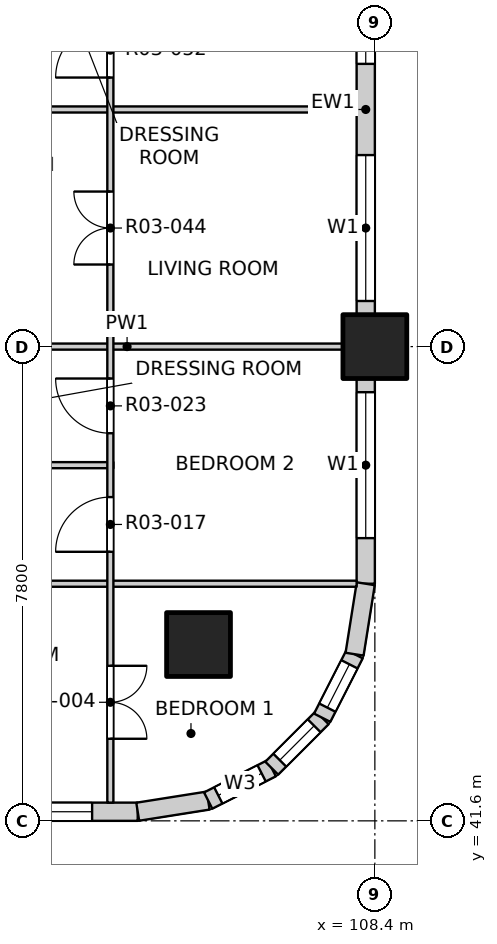
"""IFC4 building model, lengths in metres.
Left out: names, types, materials, properties, quantities, classifications, styles, units other than length and angle.
Written with IfcOpenShell. Run it as: python <this file> out.ifc"""

import sys

from ifc_helpers import new_model, si_unit, direction, frame, frame_2d, origin, origin_2d, place, context, subcontext, project, spatial, rectangle, extrude, element, fill, save


model = new_model("IFC4")
c1 = context("Model", 3, precision=1e-05, world=origin(), true_north=direction((0.0, 1.0)))
c2 = subcontext(c1, "Body", "Model", "MODEL_VIEW")
j1 = project(units=[si_unit("LENGTHUNIT", "METRE"), si_unit("PLANEANGLEUNIT", "RADIAN")], contexts=[c1])
p1 = place(None, origin())
s1 = spatial("IfcSite", under=j1, at=p1, CompositionType="ELEMENT")
p2 = place(p1, origin())
s2 = spatial("IfcBuilding", under=s1, at=p2, CompositionType="ELEMENT")
p3 = place(p2, frame((0.0, 0.0, 39.9)))
s3 = spatial("IfcBuildingStorey", under=s2, at=p3, CompositionType="ELEMENT", Elevation=39.9)
for number, where, z_axis, x_axis in (
    (1, (105.5, 44.5, -0.25), (0.0, 0.0, 1.0), (1.0, 0.0, 0.0)),
    (2, (108.4, 49.4, -0.25), (0.0, 0.0, 1.0), (1.0, 0.0, 0.0)),
):
    element("IfcColumn", number, at=place(p3, frame(where, z_axis=z_axis, x_axis=x_axis)), inside=s3, PredefinedType="COLUMN", context=c2, shape_type="SweptSolid", body=[
        extrude(rectangle(XDim=1.05, YDim=1.05, at=origin_2d()), origin(), (0.0, 0.0, 1.0), 3.4),
    ])
p4 = place(p3, frame((101.125, 41.75, 0.0), z_axis=(0.0, 0.0, 1.0), x_axis=(1.0, 0.0, 0.0)))
e3 = element("IfcWall", 3, at=p4, inside=s3, PredefinedType="SOLIDWALL", context=c2, shape_type="SweptSolid", body=[
    extrude(rectangle(XDim=3.375, YDim=0.3, at=frame_2d((1.688, 0.0))), origin(), (0.0, 0.0, 1.0), 2.7),
])
p5 = place(p4, frame((0.225, 0.0, 0.9)))
e4 = element("IfcOpeningElement", 4, at=p5, cuts=e3, PredefinedType="OPENING", context=c2, shape_type="SweptSolid", body=[
    extrude(rectangle(XDim=2.4, YDim=1.8, at=frame_2d((1.2, 0.9))), frame((0.0, 0.16, 0.0), z_axis=(0.0, -1.0, 0.0), x_axis=(1.0, 0.0, 0.0)), (0.0, 0.0, 1.0), 0.32),
])
p6 = place(p3, frame((108.25, 45.5, 0.0), z_axis=(0.0, 0.0, 1.0), x_axis=(0.0, 1.0, 0.0)))
e5 = element("IfcWall", 5, at=p6, inside=s3, PredefinedType="SOLIDWALL", context=c2, shape_type="SweptSolid", body=[
    extrude(rectangle(XDim=3.375, YDim=0.3, at=frame_2d((1.688, 0.0))), origin(), (0.0, 0.0, 1.0), 2.7),
])
p7 = place(p6, frame((0.75, 0.0, 0.9)))
e6 = element("IfcOpeningElement", 6, at=p7, cuts=e5, PredefinedType="OPENING", context=c2, shape_type="SweptSolid", body=[
    extrude(rectangle(XDim=2.4, YDim=1.8, at=frame_2d((1.2, 0.9))), frame((0.0, 0.16, 0.0), z_axis=(0.0, -1.0, 0.0), x_axis=(1.0, 0.0, 0.0)), (0.0, 0.0, 1.0), 0.32),
])
p8 = place(p3, frame((108.25, 49.925, 0.0), z_axis=(0.0, 0.0, 1.0), x_axis=(0.0, 1.0, 0.0)))
e7 = element("IfcWall", 7, at=p8, inside=s3, PredefinedType="SOLIDWALL", context=c2, shape_type="SweptSolid", body=[
    extrude(rectangle(XDim=6.75, YDim=0.3, at=frame_2d((3.375, 0.0))), origin(), (0.0, 0.0, 1.0), 2.7),
])
p9 = place(p8, frame((0.225, 0.0, 0.9)))
e8 = element("IfcOpeningElement", 8, at=p9, cuts=e7, PredefinedType="OPENING", context=c2, shape_type="SweptSolid", body=[
    extrude(rectangle(XDim=2.4, YDim=1.8, at=frame_2d((1.2, 0.9))), frame((0.0, 0.16, 0.0), z_axis=(0.0, -1.0, 0.0), x_axis=(1.0, 0.0, 0.0)), (0.0, 0.0, 1.0), 0.32),
])
p10 = place(p8, frame((4.125, 0.0, 0.9)))
e9 = element("IfcOpeningElement", 9, at=p10, cuts=e7, PredefinedType="OPENING", context=c2, shape_type="SweptSolid", body=[
    extrude(rectangle(XDim=2.4, YDim=1.8, at=frame_2d((1.2, 0.9))), frame((0.0, 0.16, 0.0), z_axis=(0.0, -1.0, 0.0), x_axis=(1.0, 0.0, 0.0)), (0.0, 0.0, 1.0), 0.32),
])
p11 = place(p3, frame((104.5, 41.75, 0.0), z_axis=(0.0, 0.0, 1.0), x_axis=(0.987678452879, 0.156496880861, 0.0)))
e10 = element("IfcWall", 10, at=p11, inside=s3, PredefinedType="SOLIDWALL", context=c2, shape_type="SweptSolid", body=[
    extrude(rectangle(XDim=1.173, YDim=0.3, at=frame_2d((0.586, 0.0))), origin(), (0.0, 0.0, 1.0), 2.7),
])
p12 = place(p3, frame((105.659, 41.934, 0.0), z_axis=(0.0, 0.0, 1.0), x_axis=(0.890988677504, 0.454025524128, 0.0)))
e11 = element("IfcWall", 11, at=p12, inside=s3, PredefinedType="SOLIDWALL", context=c2, shape_type="SweptSolid", body=[
    extrude(rectangle(XDim=1.173, YDim=0.3, at=frame_2d((0.587, 0.0))), origin(), (0.0, 0.0, 1.0), 2.7),
])
p13 = place(p12, frame((0.187, 0.0, 0.9)))
e12 = element("IfcOpeningElement", 12, at=p13, cuts=e11, PredefinedType="OPENING", context=c2, shape_type="SweptSolid", body=[
    extrude(rectangle(XDim=0.8, YDim=1.2, at=frame_2d((0.4, 0.6))), frame((0.0, 0.16, 0.0), z_axis=(0.0, -1.0, 0.0), x_axis=(1.0, 0.0, 0.0)), (0.0, 0.0, 1.0), 0.32),
])
p14 = place(p3, frame((106.704, 42.466, 0.0), z_axis=(0.0, 0.0, 1.0), x_axis=(0.707106781187, 0.707106781187, 0.0)))
e13 = element("IfcWall", 13, at=p14, inside=s3, PredefinedType="SOLIDWALL", context=c2, shape_type="SweptSolid", body=[
    extrude(rectangle(XDim=1.173, YDim=0.3, at=frame_2d((0.586, 0.0))), origin(), (0.0, 0.0, 1.0), 2.7),
])
p15 = place(p14, frame((0.187, 0.0, 0.9)))
e14 = element("IfcOpeningElement", 14, at=p15, cuts=e13, PredefinedType="OPENING", context=c2, shape_type="SweptSolid", body=[
    extrude(rectangle(XDim=0.8, YDim=1.2, at=frame_2d((0.4, 0.6))), frame((0.0, 0.16, 0.0), z_axis=(0.0, -1.0, 0.0), x_axis=(1.0, 0.0, 0.0)), (0.0, 0.0, 1.0), 0.32),
])
p16 = place(p3, frame((107.534, 43.296, 0.0), z_axis=(0.0, 0.0, 1.0), x_axis=(0.454025524128, 0.890988677504, 0.0)))
e15 = element("IfcWall", 15, at=p16, inside=s3, PredefinedType="SOLIDWALL", context=c2, shape_type="SweptSolid", body=[
    extrude(rectangle(XDim=1.173, YDim=0.3, at=frame_2d((0.587, 0.0))), origin(), (0.0, 0.0, 1.0), 2.7),
])
p17 = place(p16, frame((0.187, 0.0, 0.9)))
e16 = element("IfcOpeningElement", 16, at=p17, cuts=e15, PredefinedType="OPENING", context=c2, shape_type="SweptSolid", body=[
    extrude(rectangle(XDim=0.8, YDim=1.2, at=frame_2d((0.4, 0.6))), frame((0.0, 0.16, 0.0), z_axis=(0.0, -1.0, 0.0), x_axis=(1.0, 0.0, 0.0)), (0.0, 0.0, 1.0), 0.32),
])
p18 = place(p3, frame((108.066, 44.341, 0.0), z_axis=(0.0, 0.0, 1.0), x_axis=(0.156496880861, 0.987678452879, 0.0)))
e17 = element("IfcWall", 17, at=p18, inside=s3, PredefinedType="SOLIDWALL", context=c2, shape_type="SweptSolid", body=[
    extrude(rectangle(XDim=1.173, YDim=0.3, at=frame_2d((0.586, 0.0))), origin(), (0.0, 0.0, 1.0), 2.7),
])
p19 = place(p3, frame((96.6, 45.5, 0.0), z_axis=(0.0, 0.0, 1.0), x_axis=(1.0, 0.0, 0.0)))
e18 = element("IfcWall", 18, at=p19, inside=s3, PredefinedType="PARTITIONING", context=c2, shape_type="SweptSolid", body=[
    extrude(rectangle(XDim=11.5, YDim=0.1, at=frame_2d((5.75, 0.0))), origin(), (0.0, 0.0, 1.0), 3.15),
])
p20 = place(p19, frame((2.635, 0.0, 0.0)))
e19 = element("IfcOpeningElement", 19, at=p20, cuts=e18, PredefinedType="OPENING", context=c2, shape_type="SweptSolid", body=[
    extrude(rectangle(XDim=0.9, YDim=2.1, at=frame_2d((0.45, 1.05))), frame((0.0, 0.06, 0.0), z_axis=(0.0, -1.0, 0.0), x_axis=(1.0, 0.0, 0.0)), (0.0, 0.0, 1.0), 0.12),
])
p21 = place(p3, frame((100.55, 47.45, 0.0), z_axis=(0.0, 0.0, 1.0), x_axis=(1.0, 0.0, 0.0)))
e20 = element("IfcWall", 20, at=p21, inside=s3, PredefinedType="PARTITIONING", context=c2, shape_type="SweptSolid", body=[
    extrude(rectangle(XDim=3.55, YDim=0.1, at=frame_2d((1.775, 0.0))), origin(), (0.0, 0.0, 1.0), 3.15),
])
for number, where, z_axis, x_axis in (
    (21, (100.55, 49.4, 0.0), (0.0, 0.0, 1.0), (1.0, 0.0, 0.0)),
    (22, (100.55, 53.3, 0.0), (0.0, 0.0, 1.0), (1.0, 0.0, 0.0)),
):
    element("IfcWall", number, at=place(p3, frame(where, z_axis=z_axis, x_axis=x_axis)), inside=s3, PredefinedType="PARTITIONING", context=c2, shape_type="SweptSolid", body=[
        extrude(rectangle(XDim=7.55, YDim=0.1, at=frame_2d((3.775, 0.0))), origin(), (0.0, 0.0, 1.0), 3.15),
    ])
p22 = place(p3, frame((104.05, 41.9, 0.0), z_axis=(0.0, 0.0, 1.0), x_axis=(0.0, 1.0, 0.0)))
e23 = element("IfcWall", 23, at=p22, inside=s3, PredefinedType="PARTITIONING", context=c2, shape_type="SweptSolid", body=[
    extrude(rectangle(XDim=46.2, YDim=0.1, at=frame_2d((23.1, 0.0))), origin(), (0.0, 0.0, 1.0), 3.15),
])
p23 = place(p22, frame((1.05, 0.0, 0.0)))
e24 = element("IfcOpeningElement", 24, at=p23, cuts=e23, PredefinedType="OPENING", context=c2, shape_type="SweptSolid", body=[
    extrude(rectangle(XDim=1.2, YDim=2.1, at=frame_2d((0.6, 1.05))), frame((0.0, 0.06, 0.0), z_axis=(0.0, -1.0, 0.0), x_axis=(1.0, 0.0, 0.0)), (0.0, 0.0, 1.0), 0.12),
])
p24 = place(p22, frame((4.125, 0.0, 0.0)))
e25 = element("IfcOpeningElement", 25, at=p24, cuts=e23, PredefinedType="OPENING", context=c2, shape_type="SweptSolid", body=[
    extrude(rectangle(XDim=0.9, YDim=2.1, at=frame_2d((0.45, 1.05))), frame((0.0, 0.06, 0.0), z_axis=(0.0, -1.0, 0.0), x_axis=(1.0, 0.0, 0.0)), (0.0, 0.0, 1.0), 0.12),
])
p25 = place(p22, frame((6.075, 0.0, 0.0)))
e26 = element("IfcOpeningElement", 26, at=p25, cuts=e23, PredefinedType="OPENING", context=c2, shape_type="SweptSolid", body=[
    extrude(rectangle(XDim=0.9, YDim=2.1, at=frame_2d((0.45, 1.05))), frame((0.0, 0.06, 0.0), z_axis=(0.0, -1.0, 0.0), x_axis=(1.0, 0.0, 0.0)), (0.0, 0.0, 1.0), 0.12),
])
p26 = place(p22, frame((8.85, 0.0, 0.0)))
e27 = element("IfcOpeningElement", 27, at=p26, cuts=e23, PredefinedType="OPENING", context=c2, shape_type="SweptSolid", body=[
    extrude(rectangle(XDim=1.2, YDim=2.1, at=frame_2d((0.6, 1.05))), frame((0.0, 0.06, 0.0), z_axis=(0.0, -1.0, 0.0), x_axis=(1.0, 0.0, 0.0)), (0.0, 0.0, 1.0), 0.12),
])
p27 = place(p22, frame((11.925, 0.0, 0.0)))
e28 = element("IfcOpeningElement", 28, at=p27, cuts=e23, PredefinedType="OPENING", context=c2, shape_type="SweptSolid", body=[
    extrude(rectangle(XDim=0.9, YDim=2.1, at=frame_2d((0.45, 1.05))), frame((0.0, 0.06, 0.0), z_axis=(0.0, -1.0, 0.0), x_axis=(1.0, 0.0, 0.0)), (0.0, 0.0, 1.0), 0.12),
])
p28 = place(p22, frame((13.875, 0.0, 0.0)))
e29 = element("IfcOpeningElement", 29, at=p28, cuts=e23, PredefinedType="OPENING", context=c2, shape_type="SweptSolid", body=[
    extrude(rectangle(XDim=0.9, YDim=2.1, at=frame_2d((0.45, 1.05))), frame((0.0, 0.06, 0.0), z_axis=(0.0, -1.0, 0.0), x_axis=(1.0, 0.0, 0.0)), (0.0, 0.0, 1.0), 0.12),
])
p29 = place(p22, frame((15.825, 0.0, 0.0)))
e30 = element("IfcOpeningElement", 30, at=p29, cuts=e23, PredefinedType="OPENING", context=c2, shape_type="SweptSolid", body=[
    extrude(rectangle(XDim=0.9, YDim=2.1, at=frame_2d((0.45, 1.05))), frame((0.0, 0.06, 0.0), z_axis=(0.0, -1.0, 0.0), x_axis=(1.0, 0.0, 0.0)), (0.0, 0.0, 1.0), 0.12),
])
p30 = place(p22, frame((17.775, 0.0, 0.0)))
e31 = element("IfcOpeningElement", 31, at=p30, cuts=e23, PredefinedType="OPENING", context=c2, shape_type="SweptSolid", body=[
    extrude(rectangle(XDim=0.9, YDim=2.1, at=frame_2d((0.45, 1.05))), frame((0.0, 0.06, 0.0), z_axis=(0.0, -1.0, 0.0), x_axis=(1.0, 0.0, 0.0)), (0.0, 0.0, 1.0), 0.12),
])
p31 = place(p22, frame((19.725, 0.0, 0.0)))
e32 = element("IfcOpeningElement", 32, at=p31, cuts=e23, PredefinedType="OPENING", context=c2, shape_type="SweptSolid", body=[
    extrude(rectangle(XDim=0.9, YDim=2.1, at=frame_2d((0.45, 1.05))), frame((0.0, 0.06, 0.0), z_axis=(0.0, -1.0, 0.0), x_axis=(1.0, 0.0, 0.0)), (0.0, 0.0, 1.0), 0.12),
])
p32 = place(p22, frame((21.675, 0.0, 0.0)))
e33 = element("IfcOpeningElement", 33, at=p32, cuts=e23, PredefinedType="OPENING", context=c2, shape_type="SweptSolid", body=[
    extrude(rectangle(XDim=0.9, YDim=2.1, at=frame_2d((0.45, 1.05))), frame((0.0, 0.06, 0.0), z_axis=(0.0, -1.0, 0.0), x_axis=(1.0, 0.0, 0.0)), (0.0, 0.0, 1.0), 0.12),
])
p33 = place(p22, frame((24.45, 0.0, 0.0)))
e34 = element("IfcOpeningElement", 34, at=p33, cuts=e23, PredefinedType="OPENING", context=c2, shape_type="SweptSolid", body=[
    extrude(rectangle(XDim=1.2, YDim=2.1, at=frame_2d((0.6, 1.05))), frame((0.0, 0.06, 0.0), z_axis=(0.0, -1.0, 0.0), x_axis=(1.0, 0.0, 0.0)), (0.0, 0.0, 1.0), 0.12),
])
p34 = place(p22, frame((28.35, 0.0, 0.0)))
e35 = element("IfcOpeningElement", 35, at=p34, cuts=e23, PredefinedType="OPENING", context=c2, shape_type="SweptSolid", body=[
    extrude(rectangle(XDim=1.2, YDim=2.1, at=frame_2d((0.6, 1.05))), frame((0.0, 0.06, 0.0), z_axis=(0.0, -1.0, 0.0), x_axis=(1.0, 0.0, 0.0)), (0.0, 0.0, 1.0), 0.12),
])
p35 = place(p22, frame((31.425, 0.0, 0.0)))
e36 = element("IfcOpeningElement", 36, at=p35, cuts=e23, PredefinedType="OPENING", context=c2, shape_type="SweptSolid", body=[
    extrude(rectangle(XDim=0.9, YDim=2.1, at=frame_2d((0.45, 1.05))), frame((0.0, 0.06, 0.0), z_axis=(0.0, -1.0, 0.0), x_axis=(1.0, 0.0, 0.0)), (0.0, 0.0, 1.0), 0.12),
])
p36 = place(p22, frame((33.375, 0.0, 0.0)))
e37 = element("IfcOpeningElement", 37, at=p36, cuts=e23, PredefinedType="OPENING", context=c2, shape_type="SweptSolid", body=[
    extrude(rectangle(XDim=0.9, YDim=2.1, at=frame_2d((0.45, 1.05))), frame((0.0, 0.06, 0.0), z_axis=(0.0, -1.0, 0.0), x_axis=(1.0, 0.0, 0.0)), (0.0, 0.0, 1.0), 0.12),
])
p37 = place(p22, frame((35.325, 0.0, 0.0)))
e38 = element("IfcOpeningElement", 38, at=p37, cuts=e23, PredefinedType="OPENING", context=c2, shape_type="SweptSolid", body=[
    extrude(rectangle(XDim=0.9, YDim=2.1, at=frame_2d((0.45, 1.05))), frame((0.0, 0.06, 0.0), z_axis=(0.0, -1.0, 0.0), x_axis=(1.0, 0.0, 0.0)), (0.0, 0.0, 1.0), 0.12),
])
p38 = place(p22, frame((37.275, 0.0, 0.0)))
e39 = element("IfcOpeningElement", 39, at=p38, cuts=e23, PredefinedType="OPENING", context=c2, shape_type="SweptSolid", body=[
    extrude(rectangle(XDim=0.9, YDim=2.1, at=frame_2d((0.45, 1.05))), frame((0.0, 0.06, 0.0), z_axis=(0.0, -1.0, 0.0), x_axis=(1.0, 0.0, 0.0)), (0.0, 0.0, 1.0), 0.12),
])
p39 = place(p22, frame((40.05, 0.0, 0.0)))
e40 = element("IfcOpeningElement", 40, at=p39, cuts=e23, PredefinedType="OPENING", context=c2, shape_type="SweptSolid", body=[
    extrude(rectangle(XDim=1.2, YDim=2.1, at=frame_2d((0.6, 1.05))), frame((0.0, 0.06, 0.0), z_axis=(0.0, -1.0, 0.0), x_axis=(1.0, 0.0, 0.0)), (0.0, 0.0, 1.0), 0.12),
])
p40 = place(p22, frame((43.95, 0.0, 0.0)))
e41 = element("IfcOpeningElement", 41, at=p40, cuts=e23, PredefinedType="OPENING", context=c2, shape_type="SweptSolid", body=[
    extrude(rectangle(XDim=1.2, YDim=2.1, at=frame_2d((0.6, 1.05))), frame((0.0, 0.06, 0.0), z_axis=(0.0, -1.0, 0.0), x_axis=(1.0, 0.0, 0.0)), (0.0, 0.0, 1.0), 0.12),
])
p41 = place(p5, origin())
e42 = element("IfcWindow", 42, at=p41, inside=s3, PartitioningType="DOUBLE_PANEL_VERTICAL", PredefinedType="WINDOW", context=c2, shape_type="SweptSolid", body=[
    extrude(rectangle(XDim=2.4, YDim=1.8, at=frame_2d((1.2, 0.9))), frame((0.0, 0.03, 0.0), z_axis=(0.0, -1.0, 0.0), x_axis=(1.0, 0.0, 0.0)), (0.0, 0.0, 1.0), 0.06),
])
fill(e4, e42)
p42 = place(p7, origin())
e43 = element("IfcWindow", 43, at=p42, inside=s3, PartitioningType="DOUBLE_PANEL_VERTICAL", PredefinedType="WINDOW", context=c2, shape_type="SweptSolid", body=[
    extrude(rectangle(XDim=2.4, YDim=1.8, at=frame_2d((1.2, 0.9))), frame((0.0, 0.03, 0.0), z_axis=(0.0, -1.0, 0.0), x_axis=(1.0, 0.0, 0.0)), (0.0, 0.0, 1.0), 0.06),
])
fill(e6, e43)
p43 = place(p9, origin())
e44 = element("IfcWindow", 44, at=p43, inside=s3, PartitioningType="DOUBLE_PANEL_VERTICAL", PredefinedType="WINDOW", context=c2, shape_type="SweptSolid", body=[
    extrude(rectangle(XDim=2.4, YDim=1.8, at=frame_2d((1.2, 0.9))), frame((0.0, 0.03, 0.0), z_axis=(0.0, -1.0, 0.0), x_axis=(1.0, 0.0, 0.0)), (0.0, 0.0, 1.0), 0.06),
])
fill(e8, e44)
p44 = place(p10, origin())
e45 = element("IfcWindow", 45, at=p44, inside=s3, PartitioningType="DOUBLE_PANEL_VERTICAL", PredefinedType="WINDOW", context=c2, shape_type="SweptSolid", body=[
    extrude(rectangle(XDim=2.4, YDim=1.8, at=frame_2d((1.2, 0.9))), frame((0.0, 0.03, 0.0), z_axis=(0.0, -1.0, 0.0), x_axis=(1.0, 0.0, 0.0)), (0.0, 0.0, 1.0), 0.06),
])
fill(e9, e45)
p45 = place(p13, origin())
e46 = element("IfcWindow", 46, at=p45, inside=s3, PartitioningType="SINGLE_PANEL", PredefinedType="WINDOW", context=c2, shape_type="SweptSolid", body=[
    extrude(rectangle(XDim=0.8, YDim=1.2, at=frame_2d((0.4, 0.6))), frame((0.0, 0.03, 0.0), z_axis=(0.0, -1.0, 0.0), x_axis=(1.0, 0.0, 0.0)), (0.0, 0.0, 1.0), 0.06),
])
fill(e12, e46)
p46 = place(p15, origin())
e47 = element("IfcWindow", 47, at=p46, inside=s3, PartitioningType="SINGLE_PANEL", PredefinedType="WINDOW", context=c2, shape_type="SweptSolid", body=[
    extrude(rectangle(XDim=0.8, YDim=1.2, at=frame_2d((0.4, 0.6))), frame((0.0, 0.03, 0.0), z_axis=(0.0, -1.0, 0.0), x_axis=(1.0, 0.0, 0.0)), (0.0, 0.0, 1.0), 0.06),
])
fill(e14, e47)
p47 = place(p17, origin())
e48 = element("IfcWindow", 48, at=p47, inside=s3, PartitioningType="SINGLE_PANEL", PredefinedType="WINDOW", context=c2, shape_type="SweptSolid", body=[
    extrude(rectangle(XDim=0.8, YDim=1.2, at=frame_2d((0.4, 0.6))), frame((0.0, 0.03, 0.0), z_axis=(0.0, -1.0, 0.0), x_axis=(1.0, 0.0, 0.0)), (0.0, 0.0, 1.0), 0.06),
])
fill(e16, e48)
p48 = place(p23, origin())
e49 = element("IfcDoor", 49, at=p48, inside=s3, OperationType="DOUBLE_DOOR_SINGLE_SWING", PredefinedType="DOOR", context=c2, shape_type="SweptSolid", body=[
    extrude(rectangle(XDim=1.2, YDim=2.1, at=frame_2d((0.6, 1.05))), frame((0.0, 0.025, 0.0), z_axis=(0.0, -1.0, 0.0), x_axis=(1.0, 0.0, 0.0)), (0.0, 0.0, 1.0), 0.05),
])
fill(e24, e49)
p49 = place(p24, origin())
e50 = element("IfcDoor", 50, at=p49, inside=s3, OperationType="SINGLE_SWING_LEFT", PredefinedType="DOOR", context=c2, shape_type="SweptSolid", body=[
    extrude(rectangle(XDim=0.9, YDim=2.1, at=frame_2d((0.45, 1.05))), frame((0.0, 0.025, 0.0), z_axis=(0.0, -1.0, 0.0), x_axis=(1.0, 0.0, 0.0)), (0.0, 0.0, 1.0), 0.05),
])
fill(e25, e50)
p50 = place(p25, origin())
e51 = element("IfcDoor", 51, at=p50, inside=s3, OperationType="SINGLE_SWING_RIGHT", PredefinedType="DOOR", context=c2, shape_type="SweptSolid", body=[
    extrude(rectangle(XDim=0.9, YDim=2.1, at=frame_2d((0.45, 1.05))), frame((0.0, 0.025, 0.0), z_axis=(0.0, -1.0, 0.0), x_axis=(1.0, 0.0, 0.0)), (0.0, 0.0, 1.0), 0.05),
])
fill(e26, e51)
p51 = place(p26, origin())
e52 = element("IfcDoor", 52, at=p51, inside=s3, OperationType="DOUBLE_DOOR_SINGLE_SWING", PredefinedType="DOOR", context=c2, shape_type="SweptSolid", body=[
    extrude(rectangle(XDim=1.2, YDim=2.1, at=frame_2d((0.6, 1.05))), frame((0.0, 0.025, 0.0), z_axis=(0.0, -1.0, 0.0), x_axis=(1.0, 0.0, 0.0)), (0.0, 0.0, 1.0), 0.05),
])
fill(e27, e52)
p52 = place(p27, origin())
e53 = element("IfcDoor", 53, at=p52, inside=s3, OperationType="SINGLE_SWING_LEFT", PredefinedType="DOOR", context=c2, shape_type="SweptSolid", body=[
    extrude(rectangle(XDim=0.9, YDim=2.1, at=frame_2d((0.45, 1.05))), frame((0.0, 0.025, 0.0), z_axis=(0.0, -1.0, 0.0), x_axis=(1.0, 0.0, 0.0)), (0.0, 0.0, 1.0), 0.05),
])
fill(e28, e53)
save(model, sys.argv[1])
